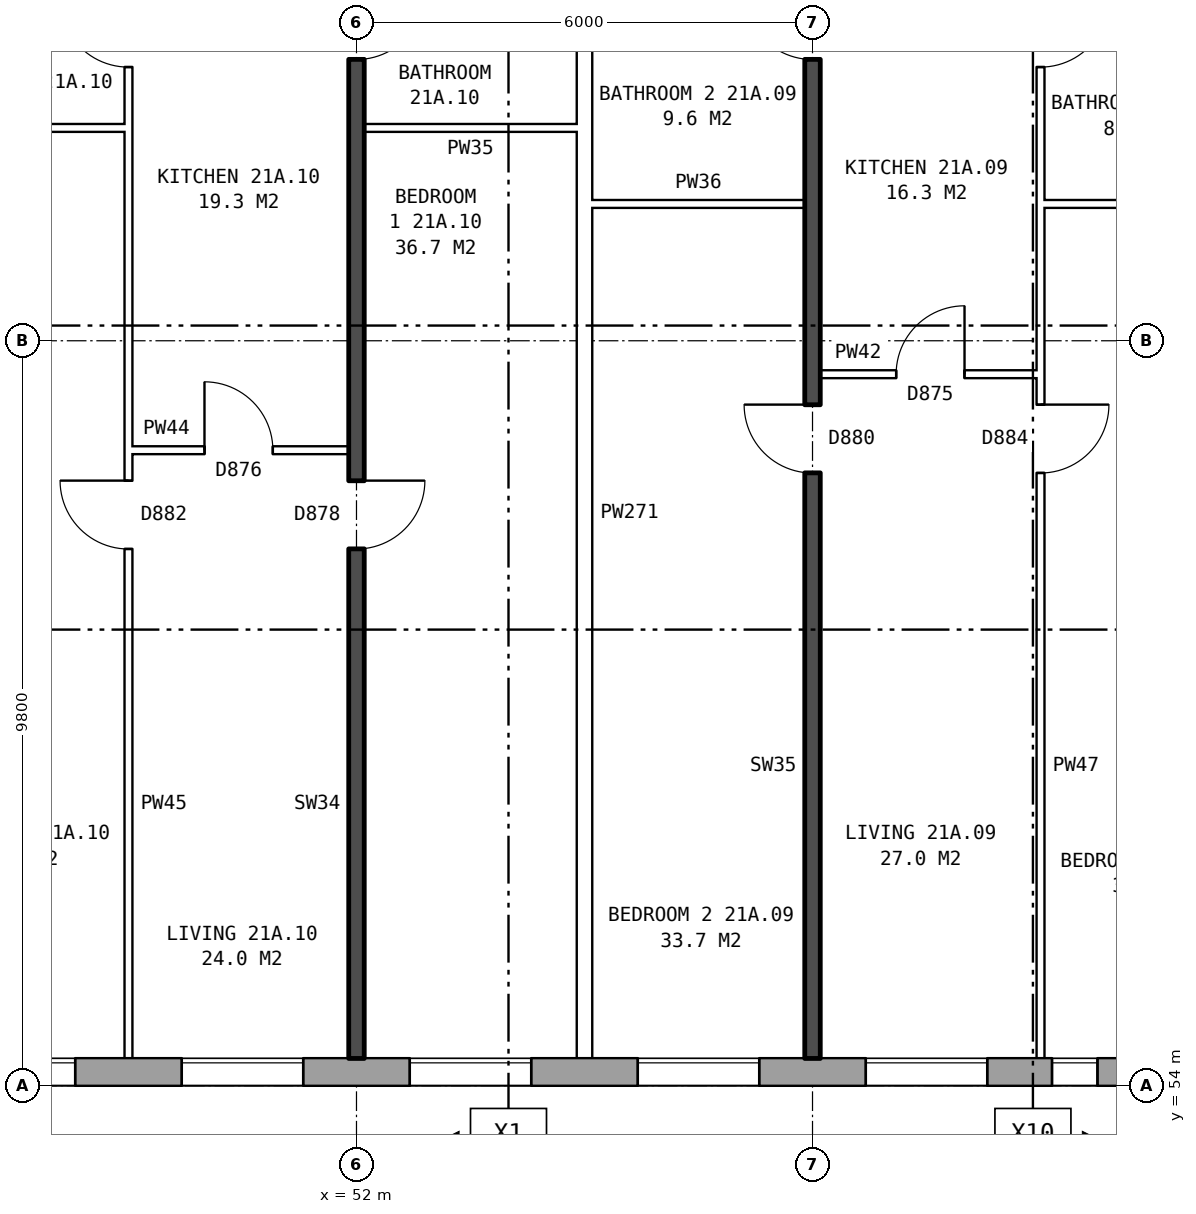
"""IFC4 building model, lengths in metres.
Left out: names, types, materials, properties, quantities, classifications, styles, units other than length and angle.
Written with IfcOpenShell. Run it as: python <this file> out.ifc"""

import sys

from ifc_helpers import new_model, si_unit, direction, frame, frame_2d, origin, place, context, subcontext, project, spatial, rectangle, extrude, element, fill, save


model = new_model("IFC4")
c1 = context("Model", 3, precision=1e-05, world=origin(), true_north=direction((0.0, 1.0)))
c2 = subcontext(c1, "Body", "Model", "MODEL_VIEW")
j1 = project(units=[si_unit("LENGTHUNIT", "METRE"), si_unit("PLANEANGLEUNIT", "RADIAN")], contexts=[c1])
p1 = place(None, origin())
s1 = spatial("IfcSite", under=j1, at=p1, CompositionType="ELEMENT")
p2 = place(p1, origin())
s2 = spatial("IfcBuilding", under=s1, at=p2, CompositionType="ELEMENT")
p3 = place(p2, frame((0.0, 0.0, 77.8)))
s3 = spatial("IfcBuildingStorey", under=s2, at=p3, CompositionType="ELEMENT", Elevation=77.8)
p4 = place(p3, frame((26.325, 54.18, 0.0), z_axis=(0.0, 0.0, 1.0), x_axis=(1.0, 0.0, 0.0)))
e1 = element("IfcWall", 1, at=p4, inside=s3, PredefinedType="STANDARD", context=c2, shape_type="SweptSolid", body=[
    extrude(rectangle(XDim=46.601, YDim=0.36, at=frame_2d((23.3, 0.0))), origin(), (0.0, 0.0, 1.0), 2.85),
])
p5 = place(p4, frame((2.375, 0.0, 0.8)))
e2 = element("IfcOpeningElement", 2, at=p5, cuts=e1, PredefinedType="OPENING", context=c2, shape_type="SweptSolid", body=[
    extrude(rectangle(XDim=1.6, YDim=1.8, at=frame_2d((0.8, 0.9))), frame((0.0, 0.19, 0.0), z_axis=(0.0, -1.0, 0.0), x_axis=(1.0, 0.0, 0.0)), (0.0, 0.0, 1.0), 0.38),
])
p6 = place(p4, frame((5.375, 0.0, 0.8)))
e3 = element("IfcOpeningElement", 3, at=p6, cuts=e1, PredefinedType="OPENING", context=c2, shape_type="SweptSolid", body=[
    extrude(rectangle(XDim=1.6, YDim=1.8, at=frame_2d((0.8, 0.9))), frame((0.0, 0.19, 0.0), z_axis=(0.0, -1.0, 0.0), x_axis=(1.0, 0.0, 0.0)), (0.0, 0.0, 1.0), 0.38),
])
p7 = place(p4, frame((7.875, 0.0, 0.8)))
e4 = element("IfcOpeningElement", 4, at=p7, cuts=e1, PredefinedType="OPENING", context=c2, shape_type="SweptSolid", body=[
    extrude(rectangle(XDim=1.6, YDim=1.8, at=frame_2d((0.8, 0.9))), frame((0.0, 0.19, 0.0), z_axis=(0.0, -1.0, 0.0), x_axis=(1.0, 0.0, 0.0)), (0.0, 0.0, 1.0), 0.38),
])
p8 = place(p4, frame((11.725, 0.0, 0.65)))
e5 = element("IfcOpeningElement", 5, at=p8, cuts=e1, PredefinedType="OPENING", context=c2, shape_type="SweptSolid", body=[
    extrude(rectangle(XDim=0.8, YDim=0.9, at=frame_2d((0.4, 0.45))), frame((0.0, 0.19, 0.0), z_axis=(0.0, -1.0, 0.0), x_axis=(1.0, 0.0, 0.0)), (0.0, 0.0, 1.0), 0.38),
])
p9 = place(p4, frame((14.375, 0.0, 0.8)))
e6 = element("IfcOpeningElement", 6, at=p9, cuts=e1, PredefinedType="OPENING", context=c2, shape_type="SweptSolid", body=[
    extrude(rectangle(XDim=1.6, YDim=1.8, at=frame_2d((0.8, 0.9))), frame((0.0, 0.19, 0.0), z_axis=(0.0, -1.0, 0.0), x_axis=(1.0, 0.0, 0.0)), (0.0, 0.0, 1.0), 0.38),
])
p10 = place(p4, frame((17.375, 0.0, 0.8)))
e7 = element("IfcOpeningElement", 7, at=p10, cuts=e1, PredefinedType="OPENING", context=c2, shape_type="SweptSolid", body=[
    extrude(rectangle(XDim=1.6, YDim=1.8, at=frame_2d((0.8, 0.9))), frame((0.0, 0.19, 0.0), z_axis=(0.0, -1.0, 0.0), x_axis=(1.0, 0.0, 0.0)), (0.0, 0.0, 1.0), 0.38),
])
p11 = place(p4, frame((20.375, 0.0, 0.8)))
e8 = element("IfcOpeningElement", 8, at=p11, cuts=e1, PredefinedType="OPENING", context=c2, shape_type="SweptSolid", body=[
    extrude(rectangle(XDim=1.6, YDim=1.8, at=frame_2d((0.8, 0.9))), frame((0.0, 0.19, 0.0), z_axis=(0.0, -1.0, 0.0), x_axis=(1.0, 0.0, 0.0)), (0.0, 0.0, 1.0), 0.38),
])
p12 = place(p4, frame((23.375, 0.0, 0.8)))
e9 = element("IfcOpeningElement", 9, at=p12, cuts=e1, PredefinedType="OPENING", context=c2, shape_type="SweptSolid", body=[
    extrude(rectangle(XDim=1.6, YDim=1.8, at=frame_2d((0.8, 0.9))), frame((0.0, 0.19, 0.0), z_axis=(0.0, -1.0, 0.0), x_axis=(1.0, 0.0, 0.0)), (0.0, 0.0, 1.0), 0.38),
])
p13 = place(p4, frame((26.375, 0.0, 0.8)))
e10 = element("IfcOpeningElement", 10, at=p13, cuts=e1, PredefinedType="OPENING", context=c2, shape_type="SweptSolid", body=[
    extrude(rectangle(XDim=1.6, YDim=1.8, at=frame_2d((0.8, 0.9))), frame((0.0, 0.19, 0.0), z_axis=(0.0, -1.0, 0.0), x_axis=(1.0, 0.0, 0.0)), (0.0, 0.0, 1.0), 0.38),
])
p14 = place(p4, frame((29.375, 0.0, 0.8)))
e11 = element("IfcOpeningElement", 11, at=p14, cuts=e1, PredefinedType="OPENING", context=c2, shape_type="SweptSolid", body=[
    extrude(rectangle(XDim=1.6, YDim=1.8, at=frame_2d((0.8, 0.9))), frame((0.0, 0.19, 0.0), z_axis=(0.0, -1.0, 0.0), x_axis=(1.0, 0.0, 0.0)), (0.0, 0.0, 1.0), 0.38),
])
p15 = place(p4, frame((32.375, 0.0, 0.8)))
e12 = element("IfcOpeningElement", 12, at=p15, cuts=e1, PredefinedType="OPENING", context=c2, shape_type="SweptSolid", body=[
    extrude(rectangle(XDim=1.6, YDim=1.8, at=frame_2d((0.8, 0.9))), frame((0.0, 0.19, 0.0), z_axis=(0.0, -1.0, 0.0), x_axis=(1.0, 0.0, 0.0)), (0.0, 0.0, 1.0), 0.38),
])
p16 = place(p4, frame((34.825, 0.0, 0.15)))
e13 = element("IfcOpeningElement", 13, at=p16, cuts=e1, PredefinedType="OPENING", context=c2, shape_type="SweptSolid", body=[
    extrude(rectangle(XDim=0.6, YDim=0.9, at=frame_2d((0.3, 0.45))), frame((0.0, 0.19, 0.0), z_axis=(0.0, -1.0, 0.0), x_axis=(1.0, 0.0, 0.0)), (0.0, 0.0, 1.0), 0.38),
])
p17 = place(p4, frame((38.375, 0.0, 0.8)))
e14 = element("IfcOpeningElement", 14, at=p17, cuts=e1, PredefinedType="OPENING", context=c2, shape_type="SweptSolid", body=[
    extrude(rectangle(XDim=1.6, YDim=1.8, at=frame_2d((0.8, 0.9))), frame((0.0, 0.19, 0.0), z_axis=(0.0, -1.0, 0.0), x_axis=(1.0, 0.0, 0.0)), (0.0, 0.0, 1.0), 0.38),
])
p18 = place(p4, frame((41.375, 0.0, 0.8)))
e15 = element("IfcOpeningElement", 15, at=p18, cuts=e1, PredefinedType="OPENING", context=c2, shape_type="SweptSolid", body=[
    extrude(rectangle(XDim=1.6, YDim=1.8, at=frame_2d((0.8, 0.9))), frame((0.0, 0.19, 0.0), z_axis=(0.0, -1.0, 0.0), x_axis=(1.0, 0.0, 0.0)), (0.0, 0.0, 1.0), 0.38),
])
p19 = place(p4, frame((44.375, 0.0, 0.8)))
e16 = element("IfcOpeningElement", 16, at=p19, cuts=e1, PredefinedType="OPENING", context=c2, shape_type="SweptSolid", body=[
    extrude(rectangle(XDim=1.6, YDim=1.8, at=frame_2d((0.8, 0.9))), frame((0.0, 0.19, 0.0), z_axis=(0.0, -1.0, 0.0), x_axis=(1.0, 0.0, 0.0)), (0.0, 0.0, 1.0), 0.38),
])
p20 = place(p4, frame((9.775, 0.0, 1.5)))
e17 = element("IfcOpeningElement", 17, at=p20, cuts=e1, PredefinedType="OPENING", context=c2, shape_type="SweptSolid", body=[
    extrude(rectangle(XDim=0.6, YDim=0.9, at=frame_2d((0.3, 0.45))), frame((0.0, 0.19, 0.0), z_axis=(0.0, -1.0, 0.0), x_axis=(1.0, 0.0, 0.0)), (0.0, 0.0, 1.0), 0.38),
])
p21 = place(p4, frame((12.825, 0.0, 0.65)))
e18 = element("IfcOpeningElement", 18, at=p21, cuts=e1, PredefinedType="OPENING", context=c2, shape_type="SweptSolid", body=[
    extrude(rectangle(XDim=0.6, YDim=1.8, at=frame_2d((0.3, 0.9))), frame((0.0, 0.19, 0.0), z_axis=(0.0, -1.0, 0.0), x_axis=(1.0, 0.0, 0.0)), (0.0, 0.0, 1.0), 0.38),
])
p22 = place(p4, frame((36.025, 0.0, 1.65)))
e19 = element("IfcOpeningElement", 19, at=p22, cuts=e1, PredefinedType="OPENING", context=c2, shape_type="SweptSolid", body=[
    extrude(rectangle(XDim=1.4, YDim=0.9, at=frame_2d((0.7, 0.45))), frame((0.0, 0.19, 0.0), z_axis=(0.0, -1.0, 0.0), x_axis=(1.0, 0.0, 0.0)), (0.0, 0.0, 1.0), 0.38),
])
p23 = place(p3, frame((49.0, 62.36, 0.0), z_axis=(0.0, 0.0, 1.0), x_axis=(1.0, 0.0, 0.0)))
e20 = element("IfcWall", 20, at=p23, inside=s3, PredefinedType="PARTITIONING", context=c2, shape_type="SweptSolid", body=[
    extrude(rectangle(XDim=2.9, YDim=0.1, at=frame_2d((1.45, 0.0))), origin(), (0.0, 0.0, 1.0), 2.85),
])
p24 = place(p23, frame((1.0, 0.0, 0.0)))
e21 = element("IfcOpeningElement", 21, at=p24, cuts=e20, PredefinedType="OPENING", context=c2, shape_type="SweptSolid", body=[
    extrude(rectangle(XDim=0.9, YDim=2.1, at=frame_2d((0.45, 1.05))), frame((0.0, 0.06, 0.0), z_axis=(0.0, -1.0, 0.0), x_axis=(1.0, 0.0, 0.0)), (0.0, 0.0, 1.0), 0.12),
])
p25 = place(p3, frame((58.1, 63.36, 0.0), z_axis=(0.0, 0.0, 1.0), x_axis=(1.0, 0.0, 0.0)))
e22 = element("IfcWall", 22, at=p25, inside=s3, PredefinedType="PARTITIONING", context=c2, shape_type="SweptSolid", body=[
    extrude(rectangle(XDim=2.9, YDim=0.1, at=frame_2d((1.45, 0.0))), origin(), (0.0, 0.0, 1.0), 2.85),
])
p26 = place(p25, frame((1.0, 0.0, 0.0)))
e23 = element("IfcOpeningElement", 23, at=p26, cuts=e22, PredefinedType="OPENING", context=c2, shape_type="SweptSolid", body=[
    extrude(rectangle(XDim=0.9, YDim=2.1, at=frame_2d((0.45, 1.05))), frame((0.0, 0.06, 0.0), z_axis=(0.0, -1.0, 0.0), x_axis=(1.0, 0.0, 0.0)), (0.0, 0.0, 1.0), 0.12),
])
p27 = place(p3, frame((55.1, 65.6, 0.0), z_axis=(0.0, 0.0, 1.0), x_axis=(1.0, 0.0, 0.0)))
e24 = element("IfcWall", 24, at=p27, inside=s3, PredefinedType="PARTITIONING", context=c2, shape_type="SweptSolid", body=[
    extrude(rectangle(XDim=2.8, YDim=0.1, at=frame_2d((1.4, 0.0))), origin(), (0.0, 0.0, 1.0), 2.85),
])
p28 = place(p3, frame((61.0, 65.6, 0.0), z_axis=(0.0, 0.0, 1.0), x_axis=(1.0, 0.0, 0.0)))
e25 = element("IfcWall", 25, at=p28, inside=s3, PredefinedType="PARTITIONING", context=c2, shape_type="SweptSolid", body=[
    extrude(rectangle(XDim=2.64, YDim=0.1, at=frame_2d((1.32, 0.0))), origin(), (0.0, 0.0, 1.0), 2.85),
])
p29 = place(p3, frame((46.1, 66.6, 0.0), z_axis=(0.0, 0.0, 1.0), x_axis=(1.0, 0.0, 0.0)))
e26 = element("IfcWall", 26, at=p29, inside=s3, PredefinedType="PARTITIONING", context=c2, shape_type="SweptSolid", body=[
    extrude(rectangle(XDim=2.9, YDim=0.1, at=frame_2d((1.45, 0.0))), origin(), (0.0, 0.0, 1.0), 2.85),
])
p30 = place(p3, frame((52.1, 66.6, 0.0), z_axis=(0.0, 0.0, 1.0), x_axis=(1.0, 0.0, 0.0)))
e27 = element("IfcWall", 27, at=p30, inside=s3, PredefinedType="PARTITIONING", context=c2, shape_type="SweptSolid", body=[
    extrude(rectangle(XDim=2.8, YDim=0.1, at=frame_2d((1.4, 0.0))), origin(), (0.0, 0.0, 1.0), 2.85),
])
p31 = place(p3, frame((49.0, 54.36, 0.0), z_axis=(0.0, 0.0, 1.0), x_axis=(0.0, 1.0, 0.0)))
e28 = element("IfcWall", 28, at=p31, inside=s3, PredefinedType="PARTITIONING", context=c2, shape_type="SweptSolid", body=[
    extrude(rectangle(XDim=14.34, YDim=0.1, at=frame_2d((7.17, 0.0))), origin(), (0.0, 0.0, 1.0), 2.85),
])
p32 = place(p31, frame((6.7, 0.0, 0.0)))
e29 = element("IfcOpeningElement", 29, at=p32, cuts=e28, PredefinedType="OPENING", context=c2, shape_type="SweptSolid", body=[
    extrude(rectangle(XDim=0.9, YDim=2.1, at=frame_2d((0.45, 1.05))), frame((0.0, 0.06, 0.0), z_axis=(0.0, -1.0, 0.0), x_axis=(1.0, 0.0, 0.0)), (0.0, 0.0, 1.0), 0.12),
])
p33 = place(p31, frame((13.04, 0.0, 0.0)))
e30 = element("IfcOpeningElement", 30, at=p33, cuts=e28, PredefinedType="OPENING", context=c2, shape_type="SweptSolid", body=[
    extrude(rectangle(XDim=0.9, YDim=2.1, at=frame_2d((0.45, 1.05))), frame((0.0, 0.06, 0.0), z_axis=(0.0, -1.0, 0.0), x_axis=(1.0, 0.0, 0.0)), (0.0, 0.0, 1.0), 0.12),
])
p34 = place(p3, frame((52.0, 54.36, 0.0), z_axis=(0.0, 0.0, 1.0), x_axis=(0.0, 1.0, 0.0)))
e31 = element("IfcWall", 31, at=p34, inside=s3, PredefinedType="SOLIDWALL", context=c2, shape_type="SweptSolid", body=[
    extrude(rectangle(XDim=14.44, YDim=0.2, at=frame_2d((7.22, 0.0))), origin(), (0.0, 0.0, 1.0), 2.85),
])
p35 = place(p34, frame((6.7, 0.0, 0.0)))
e32 = element("IfcOpeningElement", 32, at=p35, cuts=e31, PredefinedType="OPENING", context=c2, shape_type="SweptSolid", body=[
    extrude(rectangle(XDim=0.9, YDim=2.1, at=frame_2d((0.45, 1.05))), frame((0.0, 0.11, 0.0), z_axis=(0.0, -1.0, 0.0), x_axis=(1.0, 0.0, 0.0)), (0.0, 0.0, 1.0), 0.22),
])
p36 = place(p34, frame((13.14, 0.0, 0.0)))
e33 = element("IfcOpeningElement", 33, at=p36, cuts=e31, PredefinedType="OPENING", context=c2, shape_type="SweptSolid", body=[
    extrude(rectangle(XDim=0.9, YDim=2.1, at=frame_2d((0.45, 1.05))), frame((0.0, 0.11, 0.0), z_axis=(0.0, -1.0, 0.0), x_axis=(1.0, 0.0, 0.0)), (0.0, 0.0, 1.0), 0.22),
])
p37 = place(p3, frame((55.0, 54.36, 0.0), z_axis=(0.0, 0.0, 1.0), x_axis=(0.0, 1.0, 0.0)))
e34 = element("IfcWall", 34, at=p37, inside=s3, PredefinedType="PARTITIONING", context=c2, shape_type="SweptSolid", body=[
    extrude(rectangle(XDim=14.34, YDim=0.2, at=frame_2d((7.17, 0.0))), origin(), (0.0, 0.0, 1.0), 2.85),
])
p38 = place(p3, frame((58.0, 54.36, 0.0), z_axis=(0.0, 0.0, 1.0), x_axis=(0.0, 1.0, 0.0)))
e35 = element("IfcWall", 35, at=p38, inside=s3, PredefinedType="SOLIDWALL", context=c2, shape_type="SweptSolid", body=[
    extrude(rectangle(XDim=14.44, YDim=0.2, at=frame_2d((7.22, 0.0))), origin(), (0.0, 0.0, 1.0), 2.85),
])
p39 = place(p38, frame((7.7, 0.0, 0.0)))
e36 = element("IfcOpeningElement", 36, at=p39, cuts=e35, PredefinedType="OPENING", context=c2, shape_type="SweptSolid", body=[
    extrude(rectangle(XDim=0.9, YDim=2.1, at=frame_2d((0.45, 1.05))), frame((0.0, 0.11, 0.0), z_axis=(0.0, -1.0, 0.0), x_axis=(1.0, 0.0, 0.0)), (0.0, 0.0, 1.0), 0.22),
])
p40 = place(p38, frame((13.14, 0.0, 0.0)))
e37 = element("IfcOpeningElement", 37, at=p40, cuts=e35, PredefinedType="OPENING", context=c2, shape_type="SweptSolid", body=[
    extrude(rectangle(XDim=0.9, YDim=2.1, at=frame_2d((0.45, 1.05))), frame((0.0, 0.11, 0.0), z_axis=(0.0, -1.0, 0.0), x_axis=(1.0, 0.0, 0.0)), (0.0, 0.0, 1.0), 0.22),
])
p41 = place(p3, frame((61.0, 54.36, 0.0), z_axis=(0.0, 0.0, 1.0), x_axis=(0.0, 1.0, 0.0)))
e38 = element("IfcWall", 38, at=p41, inside=s3, PredefinedType="PARTITIONING", context=c2, shape_type="SweptSolid", body=[
    extrude(rectangle(XDim=14.34, YDim=0.1, at=frame_2d((7.17, 0.0))), origin(), (0.0, 0.0, 1.0), 2.85),
])
p42 = place(p41, frame((7.7, 0.0, 0.0)))
e39 = element("IfcOpeningElement", 39, at=p42, cuts=e38, PredefinedType="OPENING", context=c2, shape_type="SweptSolid", body=[
    extrude(rectangle(XDim=0.9, YDim=2.1, at=frame_2d((0.45, 1.05))), frame((0.0, 0.06, 0.0), z_axis=(0.0, -1.0, 0.0), x_axis=(1.0, 0.0, 0.0)), (0.0, 0.0, 1.0), 0.12),
])
p43 = place(p41, frame((13.04, 0.0, 0.0)))
e40 = element("IfcOpeningElement", 40, at=p43, cuts=e38, PredefinedType="OPENING", context=c2, shape_type="SweptSolid", body=[
    extrude(rectangle(XDim=0.9, YDim=2.1, at=frame_2d((0.45, 1.05))), frame((0.0, 0.06, 0.0), z_axis=(0.0, -1.0, 0.0), x_axis=(1.0, 0.0, 0.0)), (0.0, 0.0, 1.0), 0.12),
])
p44 = place(p11, origin())
e41 = element("IfcWindow", 41, at=p44, inside=s3, PartitioningType="SINGLE_PANEL", PredefinedType="WINDOW", context=c2, shape_type="SweptSolid", body=[
    extrude(rectangle(XDim=1.6, YDim=1.8, at=frame_2d((0.8, 0.9))), frame((0.0, 0.15, 0.0), z_axis=(0.0, -1.0, 0.0), x_axis=(1.0, 0.0, 0.0)), (0.0, 0.0, 1.0), 0.06),
])
fill(e8, e41)
p45 = place(p12, origin())
e42 = element("IfcWindow", 42, at=p45, inside=s3, PartitioningType="SINGLE_PANEL", PredefinedType="WINDOW", context=c2, shape_type="SweptSolid", body=[
    extrude(rectangle(XDim=1.6, YDim=1.8, at=frame_2d((0.8, 0.9))), frame((0.0, 0.15, 0.0), z_axis=(0.0, -1.0, 0.0), x_axis=(1.0, 0.0, 0.0)), (0.0, 0.0, 1.0), 0.06),
])
fill(e9, e42)
p46 = place(p13, origin())
e43 = element("IfcWindow", 43, at=p46, inside=s3, PartitioningType="SINGLE_PANEL", PredefinedType="WINDOW", context=c2, shape_type="SweptSolid", body=[
    extrude(rectangle(XDim=1.6, YDim=1.8, at=frame_2d((0.8, 0.9))), frame((0.0, 0.15, 0.0), z_axis=(0.0, -1.0, 0.0), x_axis=(1.0, 0.0, 0.0)), (0.0, 0.0, 1.0), 0.06),
])
fill(e10, e43)
p47 = place(p14, origin())
e44 = element("IfcWindow", 44, at=p47, inside=s3, PartitioningType="SINGLE_PANEL", PredefinedType="WINDOW", context=c2, shape_type="SweptSolid", body=[
    extrude(rectangle(XDim=1.6, YDim=1.8, at=frame_2d((0.8, 0.9))), frame((0.0, 0.15, 0.0), z_axis=(0.0, -1.0, 0.0), x_axis=(1.0, 0.0, 0.0)), (0.0, 0.0, 1.0), 0.06),
])
fill(e11, e44)
p48 = place(p15, origin())
e45 = element("IfcWindow", 45, at=p48, inside=s3, PartitioningType="SINGLE_PANEL", PredefinedType="WINDOW", context=c2, shape_type="SweptSolid", body=[
    extrude(rectangle(XDim=1.6, YDim=1.8, at=frame_2d((0.8, 0.9))), frame((0.0, 0.15, 0.0), z_axis=(0.0, -1.0, 0.0), x_axis=(1.0, 0.0, 0.0)), (0.0, 0.0, 1.0), 0.06),
])
fill(e12, e45)
p49 = place(p16, origin())
e46 = element("IfcWindow", 46, at=p49, inside=s3, PartitioningType="SINGLE_PANEL", PredefinedType="WINDOW", context=c2, shape_type="SweptSolid", body=[
    extrude(rectangle(XDim=0.6, YDim=0.9, at=frame_2d((0.3, 0.45))), frame((0.0, 0.15, 0.0), z_axis=(0.0, -1.0, 0.0), x_axis=(1.0, 0.0, 0.0)), (0.0, 0.0, 1.0), 0.06),
])
fill(e13, e46)
p50 = place(p42, frame((0.9, 0.0, 0.0), z_axis=(0.0, 0.0, 1.0), x_axis=(-1.0, 0.0, 0.0)))
e47 = element("IfcDoor", 47, at=p50, inside=s3, OperationType="SINGLE_SWING_LEFT", PredefinedType="DOOR", context=c2, shape_type="SweptSolid", body=[
    extrude(rectangle(XDim=0.9, YDim=2.1, at=frame_2d((0.45, 1.05))), frame((0.0, 0.025, 0.0), z_axis=(0.0, -1.0, 0.0), x_axis=(1.0, 0.0, 0.0)), (0.0, 0.0, 1.0), 0.05),
])
fill(e39, e47)
p51 = place(p39, origin())
e48 = element("IfcDoor", 48, at=p51, inside=s3, OperationType="SINGLE_SWING_RIGHT", PredefinedType="DOOR", context=c2, shape_type="SweptSolid", body=[
    extrude(rectangle(XDim=0.9, YDim=2.1, at=frame_2d((0.45, 1.05))), frame((0.0, 0.025, 0.0), z_axis=(0.0, -1.0, 0.0), x_axis=(1.0, 0.0, 0.0)), (0.0, 0.0, 1.0), 0.05),
])
fill(e36, e48)
p52 = place(p26, origin())
e49 = element("IfcDoor", 49, at=p52, inside=s3, OperationType="SINGLE_SWING_RIGHT", PredefinedType="DOOR", context=c2, shape_type="SweptSolid", body=[
    extrude(rectangle(XDim=0.9, YDim=2.1, at=frame_2d((0.45, 1.05))), frame((0.0, 0.025, 0.0), z_axis=(0.0, -1.0, 0.0), x_axis=(1.0, 0.0, 0.0)), (0.0, 0.0, 1.0), 0.05),
])
fill(e23, e49)
p53 = place(p43, frame((0.9, 0.0, 0.0), z_axis=(0.0, 0.0, 1.0), x_axis=(-1.0, 0.0, 0.0)))
e50 = element("IfcDoor", 50, at=p53, inside=s3, OperationType="SINGLE_SWING_LEFT", PredefinedType="DOOR", context=c2, shape_type="SweptSolid", body=[
    extrude(rectangle(XDim=0.9, YDim=2.1, at=frame_2d((0.45, 1.05))), frame((0.0, 0.025, 0.0), z_axis=(0.0, -1.0, 0.0), x_axis=(1.0, 0.0, 0.0)), (0.0, 0.0, 1.0), 0.05),
])
fill(e40, e50)
p54 = place(p40, origin())
e51 = element("IfcDoor", 51, at=p54, inside=s3, OperationType="SINGLE_SWING_RIGHT", PredefinedType="DOOR", context=c2, shape_type="SweptSolid", body=[
    extrude(rectangle(XDim=0.9, YDim=2.1, at=frame_2d((0.45, 1.05))), frame((0.0, 0.025, 0.0), z_axis=(0.0, -1.0, 0.0), x_axis=(1.0, 0.0, 0.0)), (0.0, 0.0, 1.0), 0.05),
])
fill(e37, e51)
p55 = place(p35, frame((0.9, 0.0, 0.0), z_axis=(0.0, 0.0, 1.0), x_axis=(-1.0, 0.0, 0.0)))
e52 = element("IfcDoor", 52, at=p55, inside=s3, OperationType="SINGLE_SWING_LEFT", PredefinedType="DOOR", context=c2, shape_type="SweptSolid", body=[
    extrude(rectangle(XDim=0.9, YDim=2.1, at=frame_2d((0.45, 1.05))), frame((0.0, 0.025, 0.0), z_axis=(0.0, -1.0, 0.0), x_axis=(1.0, 0.0, 0.0)), (0.0, 0.0, 1.0), 0.05),
])
fill(e32, e52)
p56 = place(p32, origin())
e53 = element("IfcDoor", 53, at=p56, inside=s3, OperationType="SINGLE_SWING_RIGHT", PredefinedType="DOOR", context=c2, shape_type="SweptSolid", body=[
    extrude(rectangle(XDim=0.9, YDim=2.1, at=frame_2d((0.45, 1.05))), frame((0.0, 0.025, 0.0), z_axis=(0.0, -1.0, 0.0), x_axis=(1.0, 0.0, 0.0)), (0.0, 0.0, 1.0), 0.05),
])
fill(e29, e53)
p57 = place(p24, origin())
e54 = element("IfcDoor", 54, at=p57, inside=s3, OperationType="SINGLE_SWING_LEFT", PredefinedType="DOOR", context=c2, shape_type="SweptSolid", body=[
    extrude(rectangle(XDim=0.9, YDim=2.1, at=frame_2d((0.45, 1.05))), frame((0.0, 0.025, 0.0), z_axis=(0.0, -1.0, 0.0), x_axis=(1.0, 0.0, 0.0)), (0.0, 0.0, 1.0), 0.05),
])
fill(e21, e54)
p58 = place(p36, frame((0.9, 0.0, 0.0), z_axis=(0.0, 0.0, 1.0), x_axis=(-1.0, 0.0, 0.0)))
e55 = element("IfcDoor", 55, at=p58, inside=s3, OperationType="SINGLE_SWING_LEFT", PredefinedType="DOOR", context=c2, shape_type="SweptSolid", body=[
    extrude(rectangle(XDim=0.9, YDim=2.1, at=frame_2d((0.45, 1.05))), frame((0.0, 0.025, 0.0), z_axis=(0.0, -1.0, 0.0), x_axis=(1.0, 0.0, 0.0)), (0.0, 0.0, 1.0), 0.05),
])
fill(e33, e55)
p59 = place(p33, origin())
e56 = element("IfcDoor", 56, at=p59, inside=s3, OperationType="SINGLE_SWING_RIGHT", PredefinedType="DOOR", context=c2, shape_type="SweptSolid", body=[
    extrude(rectangle(XDim=0.9, YDim=2.1, at=frame_2d((0.45, 1.05))), frame((0.0, 0.025, 0.0), z_axis=(0.0, -1.0, 0.0), x_axis=(1.0, 0.0, 0.0)), (0.0, 0.0, 1.0), 0.05),
])
fill(e30, e56)
save(model, sys.argv[1])
